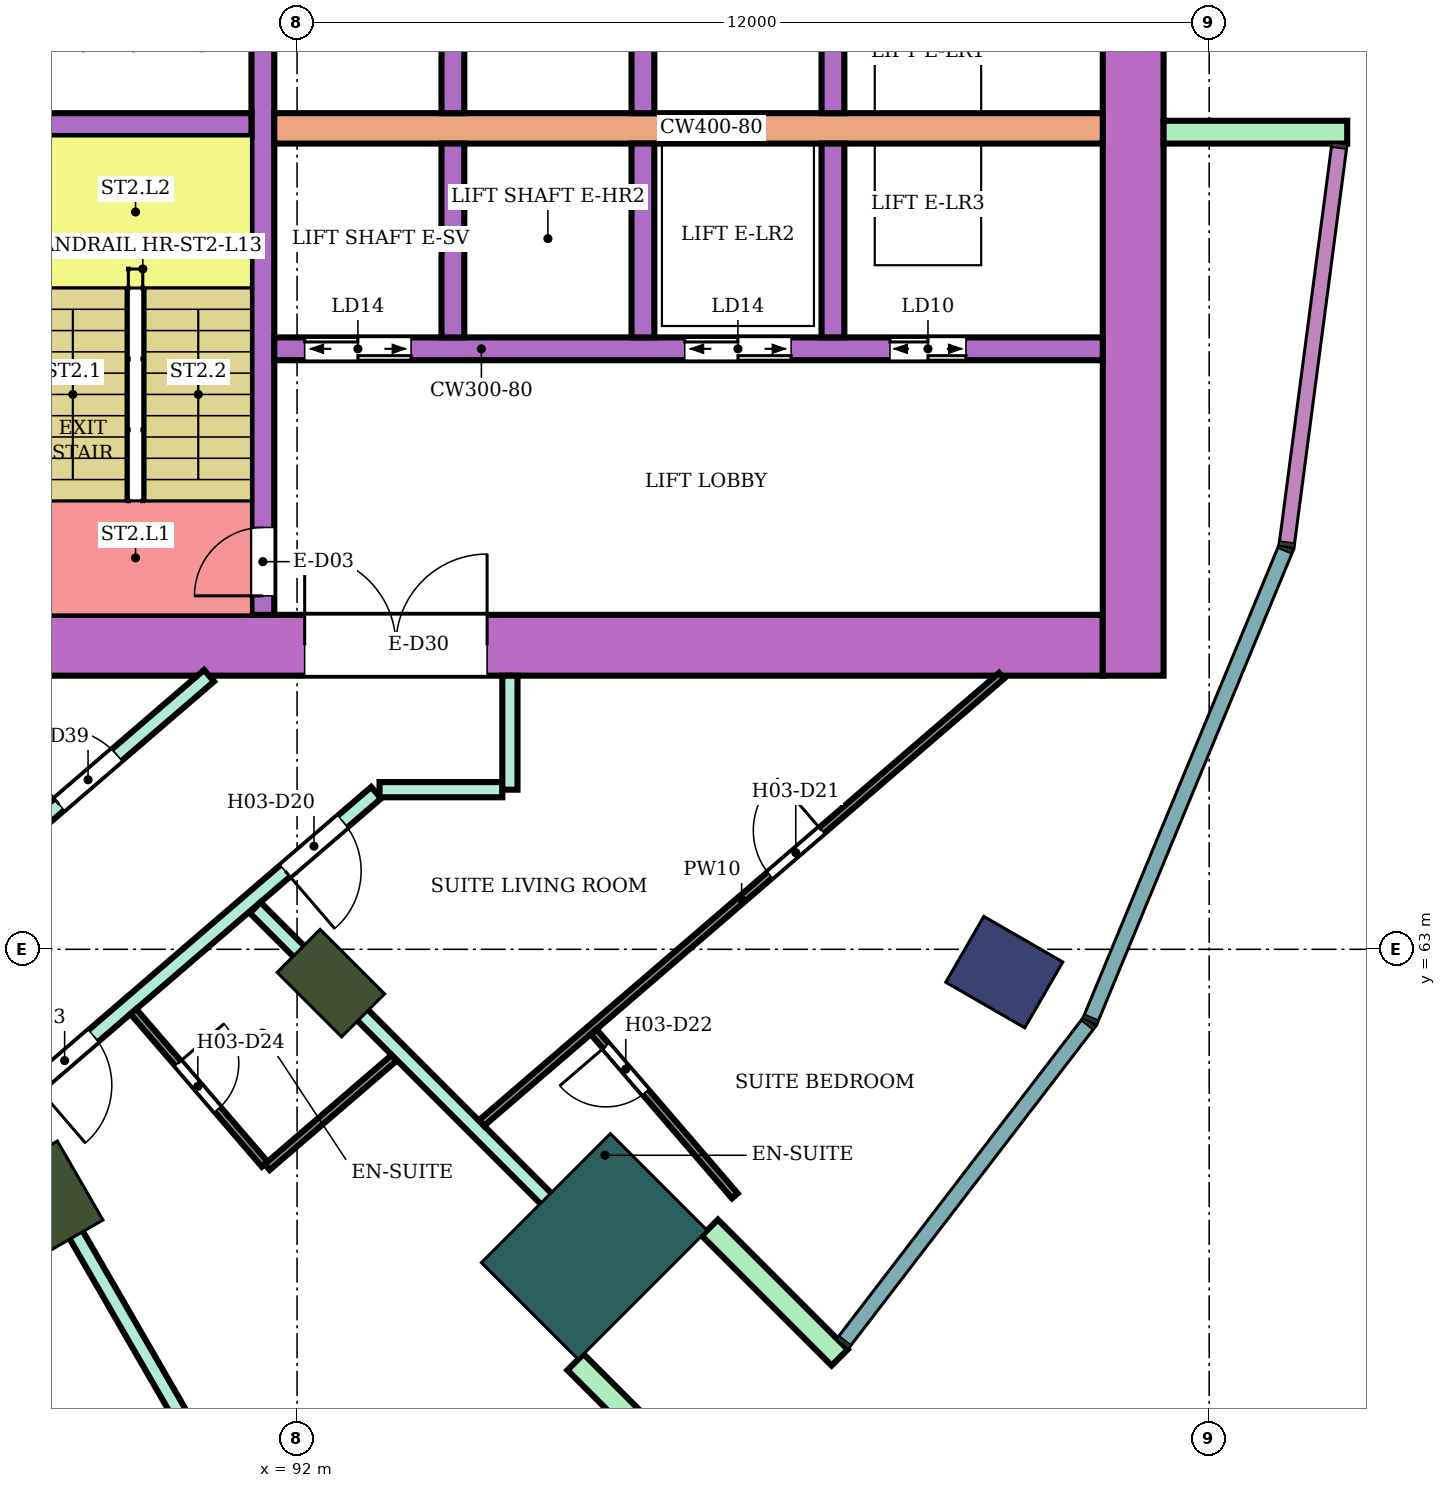
"""IFC4 building model, lengths in metres.
Left out: names, types, materials, properties, quantities, classifications, styles, units other than length and angle.
Written with IfcOpenShell. Run it as: python <this file> out.ifc"""

import sys

from ifc_helpers import new_model, si_unit, direction, frame, frame_2d, origin, origin_2d, place, context, subcontext, project, spatial, rectangle, extrude, element, fill, save


model = new_model("IFC4")
c1 = context("Model", 3, precision=1e-05, world=origin(), true_north=direction((0.0, 1.0)))
c2 = subcontext(c1, "Body", "Model", "MODEL_VIEW")
j1 = project(units=[si_unit("LENGTHUNIT", "METRE"), si_unit("PLANEANGLEUNIT", "RADIAN")], contexts=[c1])
p1 = place(None, origin())
s1 = spatial("IfcSite", under=j1, at=p1, CompositionType="ELEMENT")
p2 = place(p1, origin())
s2 = spatial("IfcBuilding", under=s1, at=p2, CompositionType="ELEMENT")
p3 = place(p2, frame((0.0, 0.0, 59.2)))
s3 = spatial("IfcBuildingStorey", under=s2, at=p3, CompositionType="ELEMENT", Elevation=59.2)
p4 = place(p3, frame((101.304, 62.7, 0.0), z_axis=(0.0, 0.0, 1.0), x_axis=(0.866025403784, -0.5, 0.0)))
e1 = element("IfcColumn", 1, at=p4, inside=s3, PredefinedType="COLUMN", context=c2, shape_type="SweptSolid", body=[
    extrude(rectangle(XDim=1.2, YDim=1.0, at=origin_2d()), origin(), (0.0, 0.0, 1.0), 3.8),
])
for number, where, z_axis, x_axis in (
    (2, (88.8, 59.758, 0.0), (0.0, 0.0, 1.0), (0.5, -0.866, 0.0)),
    (3, (92.445, 62.555, 0.0), (0.0, 0.0, 1.0), (0.707, -0.707, 0.0)),
):
    element("IfcColumn", number, at=place(p3, frame(where, z_axis=z_axis, x_axis=x_axis)), inside=s3, PredefinedType="COLUMN", context=c2, shape_type="SweptSolid", body=[
        extrude(rectangle(XDim=1.2, YDim=0.8, at=origin_2d()), origin(), (0.0, 0.0, 1.0), 3.8),
    ])
p5 = place(p3, frame((95.91, 59.09, 0.0), z_axis=(0.0, 0.0, 1.0), x_axis=(0.707106781187, -0.707106781187, 0.0)))
e4 = element("IfcColumn", 4, at=p5, inside=s3, PredefinedType="COLUMN", context=c2, shape_type="SweptSolid", body=[
    extrude(rectangle(XDim=1.8, YDim=2.4, at=origin_2d()), origin(), (0.0, 0.0, 1.0), 3.8),
])
p6 = place(p3, frame((87.9, 67.0, 0.0), z_axis=(0.0, 0.0, 1.0), x_axis=(1.0, 0.0, 0.0)))
e5 = element("IfcWall", 5, at=p6, inside=s3, PredefinedType="SHEAR", context=c2, shape_type="SweptSolid", body=[
    extrude(rectangle(XDim=14.7, YDim=0.8, at=frame_2d((7.35, 0.0))), origin(), (0.0, 0.0, 1.0), 3.48),
])
p7 = place(p6, frame((4.2, 0.0, 0.0)))
e6 = element("IfcOpeningElement", 6, at=p7, cuts=e5, PredefinedType="OPENING", context=c2, shape_type="SweptSolid", body=[
    extrude(rectangle(XDim=2.4, YDim=2.4, at=frame_2d((1.2, 1.2))), frame((0.0, 0.41, 0.0), z_axis=(0.0, -1.0, 0.0), x_axis=(1.0, 0.0, 0.0)), (0.0, 0.0, 1.0), 0.82),
])
p8 = place(p3, frame((103.0, 66.6, 0.0), z_axis=(0.0, 0.0, 1.0), x_axis=(0.0, 1.0, 0.0)))
e7 = element("IfcWall", 7, at=p8, inside=s3, PredefinedType="SHEAR", context=c2, shape_type="SweptSolid", body=[
    extrude(rectangle(XDim=16.8, YDim=0.8, at=frame_2d((8.4, 0.0))), origin(), (0.0, 0.0, 1.0), 3.48),
])
p9 = place(p3, frame((91.55, 67.4, 0.0), z_axis=(0.0, 0.0, 1.0), x_axis=(0.0, 1.0, 0.0)))
e8 = element("IfcWall", 8, at=p9, inside=s3, PredefinedType="SHEAR", context=c2, shape_type="SweptSolid", body=[
    extrude(rectangle(XDim=7.6, YDim=0.3, at=frame_2d((3.8, 0.0))), origin(), (0.0, 0.0, 1.0), 3.48),
])
p10 = place(p9, frame((0.25, 0.0, 0.0)))
e9 = element("IfcOpeningElement", 9, at=p10, cuts=e8, PredefinedType="OPENING", context=c2, shape_type="SweptSolid", body=[
    extrude(rectangle(XDim=0.9, YDim=2.1, at=frame_2d((0.45, 1.05))), frame((0.0, 0.16, 0.0), z_axis=(0.0, -1.0, 0.0), x_axis=(1.0, 0.0, 0.0)), (0.0, 0.0, 1.0), 0.32),
])
p11 = place(p3, frame((88.35, 73.85, 0.0), z_axis=(0.0, 0.0, 1.0), x_axis=(1.0, 0.0, 0.0)))
e10 = element("IfcWall", 10, at=p11, inside=s3, PredefinedType="SHEAR", context=c2, shape_type="SweptSolid", body=[
    extrude(rectangle(XDim=3.05, YDim=0.3, at=frame_2d((1.525, 0.0))), origin(), (0.0, 0.0, 1.0), 3.48),
])
p12 = place(p3, frame((91.7, 73.8, 0.0), z_axis=(0.0, 0.0, 1.0), x_axis=(1.0, 0.0, 0.0)))
e11 = element("IfcWall", 11, at=p12, inside=s3, PredefinedType="SHEAR", context=c2, shape_type="SweptSolid", body=[
    extrude(rectangle(XDim=10.9, YDim=0.4, at=frame_2d((5.45, 0.0))), origin(), (0.0, 0.0, 1.0), 3.48),
])
p13 = place(p3, frame((91.7, 70.9, 0.0), z_axis=(0.0, 0.0, 1.0), x_axis=(1.0, 0.0, 0.0)))
e12 = element("IfcWall", 12, at=p13, inside=s3, PredefinedType="SHEAR", context=c2, shape_type="SweptSolid", body=[
    extrude(rectangle(XDim=10.9, YDim=0.3, at=frame_2d((5.45, 0.0))), origin(), (0.0, 0.0, 1.0), 3.48),
])
p14 = place(p13, frame((0.4, 0.0, 0.0)))
e13 = element("IfcOpeningElement", 13, at=p14, cuts=e12, PredefinedType="OPENING", context=c2, shape_type="SweptSolid", body=[
    extrude(rectangle(XDim=1.4, YDim=2.1, at=frame_2d((0.7, 1.05))), frame((0.0, 0.16, 0.0), z_axis=(0.0, -1.0, 0.0), x_axis=(1.0, 0.0, 0.0)), (0.0, 0.0, 1.0), 0.32),
])
p15 = place(p13, frame((5.4, 0.0, 0.0)))
e14 = element("IfcOpeningElement", 14, at=p15, cuts=e12, PredefinedType="OPENING", context=c2, shape_type="SweptSolid", body=[
    extrude(rectangle(XDim=1.4, YDim=2.1, at=frame_2d((0.7, 1.05))), frame((0.0, 0.16, 0.0), z_axis=(0.0, -1.0, 0.0), x_axis=(1.0, 0.0, 0.0)), (0.0, 0.0, 1.0), 0.32),
])
p16 = place(p13, frame((8.1, 0.0, 0.0)))
e15 = element("IfcOpeningElement", 15, at=p16, cuts=e12, PredefinedType="OPENING", context=c2, shape_type="SweptSolid", body=[
    extrude(rectangle(XDim=1.0, YDim=2.1, at=frame_2d((0.5, 1.05))), frame((0.0, 0.16, 0.0), z_axis=(0.0, -1.0, 0.0), x_axis=(1.0, 0.0, 0.0)), (0.0, 0.0, 1.0), 0.32),
])
for number, where, z_axis, x_axis in (
    (16, (94.05, 74.0, 0.0), (0.0, 0.0, 1.0), (0.0, 1.0, 0.0)),
    (17, (96.55, 74.0, 0.0), (0.0, 0.0, 1.0), (0.0, 1.0, 0.0)),
    (18, (99.05, 74.0, 0.0), (0.0, 0.0, 1.0), (0.0, 1.0, 0.0)),
    (19, (94.05, 71.05, 0.0), (0.0, 0.0, 1.0), (0.0, 1.0, 0.0)),
    (20, (96.55, 71.05, 0.0), (0.0, 0.0, 1.0), (0.0, 1.0, 0.0)),
    (21, (99.05, 71.05, 0.0), (0.0, 0.0, 1.0), (0.0, 1.0, 0.0)),
):
    element("IfcWall", number, at=place(p3, frame(where, z_axis=z_axis, x_axis=x_axis)), inside=s3, PredefinedType="SHEAR", context=c2, shape_type="SweptSolid", body=[
        extrude(rectangle(XDim=2.55, YDim=0.3, at=frame_2d((1.275, 0.0))), origin(), (0.0, 0.0, 1.0), 3.48),
    ])
for number, where, z_axis, x_axis in (
    (22, (103.4, 73.75, 0.0), (0.0, 0.0, 1.0), (1.0, 0.0, 0.0)),
    (23, (95.662, 57.57, 0.0), (0.0, 0.0, 1.0), (0.707, -0.707, 0.0)),
    (24, (97.43, 59.338, 0.0), (0.0, 0.0, 1.0), (0.707, -0.707, 0.0)),
):
    element("IfcWall", number, at=place(p3, frame(where, z_axis=z_axis, x_axis=x_axis)), inside=s3, PredefinedType="NOTDEFINED", context=c2, shape_type="SweptSolid", body=[
        extrude(rectangle(XDim=2.416, YDim=0.3, at=frame_2d((1.208, 0.0))), origin(), (0.0, 0.0, 1.0), 3.8),
    ])
p17 = place(p3, frame((86.877, 63.189, 0.0), z_axis=(0.0, 0.0, 1.0), x_axis=(0.758164888471, 0.652062881853, 0.0)))
e25 = element("IfcWall", 25, at=p17, inside=s3, PredefinedType="PARTITIONING", context=c2, shape_type="SweptSolid", body=[
    extrude(rectangle(XDim=5.23, YDim=0.2, at=frame_2d((2.615, 0.0))), origin(), (0.0, 0.0, 1.0), 3.35),
])
p18 = place(p17, frame((2.63, 0.0, 0.0)))
e26 = element("IfcOpeningElement", 26, at=p18, cuts=e25, PredefinedType="OPENING", context=c2, shape_type="SweptSolid", body=[
    extrude(rectangle(XDim=1.0, YDim=2.1, at=frame_2d((0.5, 1.05))), frame((0.0, 0.11, 0.0), z_axis=(0.0, -1.0, 0.0), x_axis=(1.0, 0.0, 0.0)), (0.0, 0.0, 1.0), 0.22),
])
p19 = place(p3, frame((88.236, 60.929, 0.0), z_axis=(0.0, 0.0, 1.0), x_axis=(0.758227485202, 0.651990092474, 0.0)))
e27 = element("IfcWall", 27, at=p19, inside=s3, PredefinedType="PARTITIONING", context=c2, shape_type="SweptSolid", body=[
    extrude(rectangle(XDim=6.336, YDim=0.2, at=frame_2d((3.168, 0.0))), origin(), (0.0, 0.0, 1.0), 3.35),
])
p20 = place(p19, frame((4.757, 0.0, 0.0)))
e28 = element("IfcOpeningElement", 28, at=p20, cuts=e27, PredefinedType="OPENING", context=c2, shape_type="SweptSolid", body=[
    extrude(rectangle(XDim=1.0, YDim=2.1, at=frame_2d((0.5, 1.05))), frame((0.0, 0.11, 0.0), z_axis=(0.0, -1.0, 0.0), x_axis=(1.0, 0.0, 0.0)), (0.0, 0.0, 1.0), 0.22),
])
p21 = place(p19, frame((0.43, 0.0, 0.0)))
e29 = element("IfcOpeningElement", 29, at=p21, cuts=e27, PredefinedType="OPENING", context=c2, shape_type="SweptSolid", body=[
    extrude(rectangle(XDim=1.0, YDim=2.1, at=frame_2d((0.5, 1.05))), frame((0.0, 0.11, 0.0), z_axis=(0.0, -1.0, 0.0), x_axis=(1.0, 0.0, 0.0)), (0.0, 0.0, 1.0), 0.22),
])
p22 = place(p3, frame((88.159, 60.863, 0.0), z_axis=(0.0, 0.0, 1.0), x_axis=(0.499886028459, -0.866091195286, 0.0)))
e30 = element("IfcWall", 30, at=p22, inside=s3, PredefinedType="PARTITIONING", context=c2, shape_type="SweptSolid", body=[
    extrude(rectangle(XDim=9.475, YDim=0.2, at=frame_2d((4.737, 0.0))), origin(), (0.0, 0.0, 1.0), 3.35),
])
p23 = place(p3, frame((91.449, 63.548, 0.0), z_axis=(0.0, 0.0, 1.0), x_axis=(0.706984810649, -0.707228730688, 0.0)))
e31 = element("IfcWall", 31, at=p23, inside=s3, PredefinedType="PARTITIONING", context=c2, shape_type="SweptSolid", body=[
    extrude(rectangle(XDim=7.006, YDim=0.2, at=frame_2d((3.503, 0.0))), origin(), (0.0, 0.0, 1.0), 3.35),
])
p24 = place(p3, frame((93.085, 65.1, 0.0), z_axis=(0.0, 0.0, 1.0), x_axis=(1.0, 0.0, 0.0)))
e32 = element("IfcWall", 32, at=p24, inside=s3, PredefinedType="PARTITIONING", context=c2, shape_type="SweptSolid", body=[
    extrude(rectangle(XDim=1.615, YDim=0.2, at=frame_2d((0.808, 0.0))), origin(), (0.0, 0.0, 1.0), 3.35),
])
p25 = place(p3, frame((94.8, 65.1, 0.0), z_axis=(0.0, 0.0, 1.0), x_axis=(0.0, 1.0, 0.0)))
e33 = element("IfcWall", 33, at=p25, inside=s3, PredefinedType="PARTITIONING", context=c2, shape_type="SweptSolid", body=[
    extrude(rectangle(XDim=1.499, YDim=0.2, at=frame_2d((0.75, 0.0))), origin(), (0.0, 0.0, 1.0), 3.35),
])
p26 = place(p3, frame((89.846, 62.182, 0.0), z_axis=(0.0, 0.0, 1.0), x_axis=(0.652095405055, -0.758136915541, 0.0)))
e34 = element("IfcWall", 34, at=p26, inside=s3, PredefinedType="PARTITIONING", context=c2, shape_type="SweptSolid", body=[
    extrude(rectangle(XDim=2.65, YDim=0.1, at=frame_2d((1.325, 0.0))), origin(), (0.0, 0.0, 1.0), 3.35),
])
p27 = place(p26, frame((0.9, 0.0, 0.0)))
e35 = element("IfcOpeningElement", 35, at=p27, cuts=e34, PredefinedType="OPENING", context=c2, shape_type="SweptSolid", body=[
    extrude(rectangle(XDim=0.8, YDim=2.1, at=frame_2d((0.4, 1.05))), frame((0.0, 0.06, 0.0), z_axis=(0.0, -1.0, 0.0), x_axis=(1.0, 0.0, 0.0)), (0.0, 0.0, 1.0), 0.12),
])
p28 = place(p3, frame((91.607, 60.135, 0.0), z_axis=(0.0, 0.0, 1.0), x_axis=(0.758135842672, 0.652096652388, 0.0)))
e36 = element("IfcWall", 36, at=p28, inside=s3, PredefinedType="PARTITIONING", context=c2, shape_type="SweptSolid", body=[
    extrude(rectangle(XDim=2.201, YDim=0.1, at=frame_2d((1.101, 0.0))), origin(), (0.0, 0.0, 1.0), 3.35),
])
p29 = place(p3, frame((94.428, 60.715, 0.0), z_axis=(0.0, 0.0, 1.0), x_axis=(0.758117248367, 0.65211826974, 0.0)))
e37 = element("IfcWall", 37, at=p29, inside=s3, PredefinedType="PARTITIONING", context=c2, shape_type="SweptSolid", body=[
    extrude(rectangle(XDim=9.024, YDim=0.1, at=frame_2d((4.512, 0.0))), origin(), (0.0, 0.0, 1.0), 3.35),
])
p30 = place(p29, frame((5.002, 0.0, 0.0)))
e38 = element("IfcOpeningElement", 38, at=p30, cuts=e37, PredefinedType="OPENING", context=c2, shape_type="SweptSolid", body=[
    extrude(rectangle(XDim=0.9, YDim=2.1, at=frame_2d((0.45, 1.05))), frame((0.0, 0.06, 0.0), z_axis=(0.0, -1.0, 0.0), x_axis=(1.0, 0.0, 0.0)), (0.0, 0.0, 1.0), 0.12),
])
p31 = place(p3, frame((95.901, 61.916, 0.0), z_axis=(0.0, 0.0, 1.0), x_axis=(0.652215581117, -0.758033532074, 0.0)))
e39 = element("IfcWall", 39, at=p31, inside=s3, PredefinedType="PARTITIONING", context=c2, shape_type="SweptSolid", body=[
    extrude(rectangle(XDim=2.849, YDim=0.1, at=frame_2d((1.425, 0.0))), origin(), (0.0, 0.0, 1.0), 3.35),
])
p32 = place(p31, frame((0.25, 0.0, 0.0)))
e40 = element("IfcOpeningElement", 40, at=p32, cuts=e39, PredefinedType="OPENING", context=c2, shape_type="SweptSolid", body=[
    extrude(rectangle(XDim=0.8, YDim=2.1, at=frame_2d((0.4, 1.05))), frame((0.0, 0.06, 0.0), z_axis=(0.0, -1.0, 0.0), x_axis=(1.0, 0.0, 0.0)), (0.0, 0.0, 1.0), 0.12),
])
p33 = place(p20, frame((1.0, 0.0, 0.0), z_axis=(0.0, 0.0, 1.0), x_axis=(-1.0, 0.0, 0.0)))
e41 = element("IfcDoor", 41, at=p33, inside=s3, OperationType="SINGLE_SWING_RIGHT", PredefinedType="DOOR", context=c2, shape_type="SweptSolid", body=[
    extrude(rectangle(XDim=1.0, YDim=2.1, at=frame_2d((0.5, 1.05))), frame((0.0, 0.025, 0.0), z_axis=(0.0, -1.0, 0.0), x_axis=(1.0, 0.0, 0.0)), (0.0, 0.0, 1.0), 0.05),
])
fill(e28, e41)
p34 = place(p30, origin())
e42 = element("IfcDoor", 42, at=p34, inside=s3, OperationType="SINGLE_SWING_RIGHT", PredefinedType="DOOR", context=c2, shape_type="SweptSolid", body=[
    extrude(rectangle(XDim=0.9, YDim=2.1, at=frame_2d((0.45, 1.05))), frame((0.0, 0.025, 0.0), z_axis=(0.0, -1.0, 0.0), x_axis=(1.0, 0.0, 0.0)), (0.0, 0.0, 1.0), 0.05),
])
fill(e38, e42)
p35 = place(p32, frame((0.8, 0.0, 0.0), z_axis=(0.0, 0.0, 1.0), x_axis=(-1.0, 0.0, 0.0)))
e43 = element("IfcDoor", 43, at=p35, inside=s3, OperationType="SINGLE_SWING_RIGHT", PredefinedType="DOOR", context=c2, shape_type="SweptSolid", body=[
    extrude(rectangle(XDim=0.8, YDim=2.1, at=frame_2d((0.4, 1.05))), frame((0.0, 0.025, 0.0), z_axis=(0.0, -1.0, 0.0), x_axis=(1.0, 0.0, 0.0)), (0.0, 0.0, 1.0), 0.05),
])
fill(e40, e43)
p36 = place(p21, frame((1.0, 0.0, 0.0), z_axis=(0.0, 0.0, 1.0), x_axis=(-1.0, 0.0, 0.0)))
e44 = element("IfcDoor", 44, at=p36, inside=s3, OperationType="SINGLE_SWING_RIGHT", PredefinedType="DOOR", context=c2, shape_type="SweptSolid", body=[
    extrude(rectangle(XDim=1.0, YDim=2.1, at=frame_2d((0.5, 1.05))), frame((0.0, 0.025, 0.0), z_axis=(0.0, -1.0, 0.0), x_axis=(1.0, 0.0, 0.0)), (0.0, 0.0, 1.0), 0.05),
])
fill(e29, e44)
p37 = place(p27, origin())
e45 = element("IfcDoor", 45, at=p37, inside=s3, OperationType="SINGLE_SWING_LEFT", PredefinedType="DOOR", context=c2, shape_type="SweptSolid", body=[
    extrude(rectangle(XDim=0.8, YDim=2.1, at=frame_2d((0.4, 1.05))), frame((0.0, 0.025, 0.0), z_axis=(0.0, -1.0, 0.0), x_axis=(1.0, 0.0, 0.0)), (0.0, 0.0, 1.0), 0.05),
])
fill(e35, e45)
p38 = place(p18, origin())
e46 = element("IfcDoor", 46, at=p38, inside=s3, OperationType="SINGLE_SWING_LEFT", PredefinedType="DOOR", context=c2, shape_type="SweptSolid", body=[
    extrude(rectangle(XDim=1.0, YDim=2.1, at=frame_2d((0.5, 1.05))), frame((0.0, 0.025, 0.0), z_axis=(0.0, -1.0, 0.0), x_axis=(1.0, 0.0, 0.0)), (0.0, 0.0, 1.0), 0.05),
])
fill(e26, e46)
p39 = place(p10, origin())
e47 = element("IfcDoor", 47, at=p39, inside=s3, OperationType="SINGLE_SWING_LEFT", PredefinedType="DOOR", context=c2, shape_type="SweptSolid", body=[
    extrude(rectangle(XDim=0.9, YDim=2.1, at=frame_2d((0.45, 1.05))), frame((0.0, 0.025, 0.0), z_axis=(0.0, -1.0, 0.0), x_axis=(1.0, 0.0, 0.0)), (0.0, 0.0, 1.0), 0.05),
])
fill(e9, e47)
p40 = place(p14, origin())
e48 = element("IfcDoor", 48, at=p40, inside=s3, OperationType="DOUBLE_DOOR_SLIDING", PredefinedType="DOOR", context=c2, shape_type="SweptSolid", body=[
    extrude(rectangle(XDim=1.4, YDim=2.1, at=frame_2d((0.7, 1.05))), frame((0.0, 0.025, 0.0), z_axis=(0.0, -1.0, 0.0), x_axis=(1.0, 0.0, 0.0)), (0.0, 0.0, 1.0), 0.05),
])
fill(e13, e48)
p41 = place(p15, origin())
e49 = element("IfcDoor", 49, at=p41, inside=s3, OperationType="DOUBLE_DOOR_SLIDING", PredefinedType="DOOR", context=c2, shape_type="SweptSolid", body=[
    extrude(rectangle(XDim=1.4, YDim=2.1, at=frame_2d((0.7, 1.05))), frame((0.0, 0.025, 0.0), z_axis=(0.0, -1.0, 0.0), x_axis=(1.0, 0.0, 0.0)), (0.0, 0.0, 1.0), 0.05),
])
fill(e14, e49)
p42 = place(p16, origin())
e50 = element("IfcDoor", 50, at=p42, inside=s3, OperationType="DOUBLE_DOOR_SLIDING", PredefinedType="DOOR", context=c2, shape_type="SweptSolid", body=[
    extrude(rectangle(XDim=1.0, YDim=2.1, at=frame_2d((0.5, 1.05))), frame((0.0, 0.025, 0.0), z_axis=(0.0, -1.0, 0.0), x_axis=(1.0, 0.0, 0.0)), (0.0, 0.0, 1.0), 0.05),
])
fill(e15, e50)
p43 = place(p7, origin())
e51 = element("IfcDoor", 51, at=p43, inside=s3, OperationType="DOUBLE_DOOR_SINGLE_SWING", PredefinedType="DOOR", context=c2, shape_type="SweptSolid", body=[
    extrude(rectangle(XDim=2.4, YDim=2.4, at=frame_2d((1.2, 1.2))), frame((0.0, 0.025, 0.0), z_axis=(0.0, -1.0, 0.0), x_axis=(1.0, 0.0, 0.0)), (0.0, 0.0, 1.0), 0.05),
])
fill(e6, e51)
save(model, sys.argv[1])
